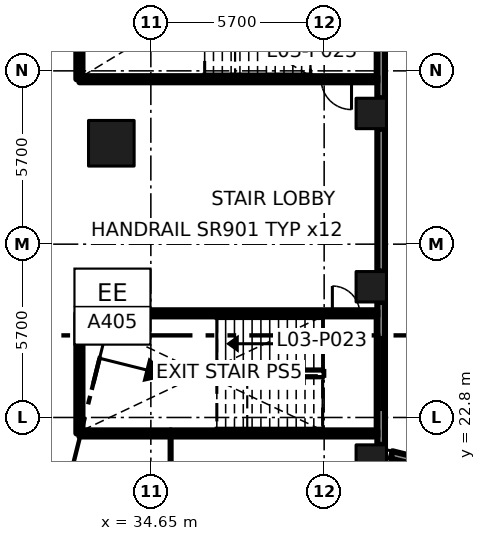
"""IFC4 building model, lengths in metres.
Left out: names, types, materials, properties, quantities, classifications, styles, units other than length and angle.
Written with IfcOpenShell. Run it as: python <this file> out.ifc"""

import sys

from ifc_helpers import new_model, si_unit, direction, frame, frame_2d, origin, origin_2d, place, context, subcontext, project, spatial, rectangle, extrude, element, fill, save


model = new_model("IFC4")
c1 = context("Model", 3, precision=1e-05, world=origin(), true_north=direction((0.0, 1.0)))
c2 = subcontext(c1, "Body", "Model", "MODEL_VIEW")
j1 = project(units=[si_unit("LENGTHUNIT", "METRE"), si_unit("PLANEANGLEUNIT", "RADIAN")], contexts=[c1])
p1 = place(None, origin())
s1 = spatial("IfcSite", under=j1, at=p1, CompositionType="ELEMENT")
p2 = place(p1, origin())
s2 = spatial("IfcBuilding", under=s1, at=p2, CompositionType="ELEMENT")
p3 = place(p2, frame((0.0, 0.0, 18.6)))
s3 = spatial("IfcBuildingStorey", under=s2, at=p3, CompositionType="ELEMENT", Elevation=18.6)
for number, where, z_axis, x_axis in (
    (1, (33.35, 26.119, 0.0), (0.0, 0.0, 1.0), (1.0, 0.0, 0.0)),
    (2, (33.35, 31.819, 0.0), (0.0, 0.0, 1.0), (1.0, 0.0, 0.0)),
):
    element("IfcColumn", number, at=place(p3, frame(where, z_axis=z_axis, x_axis=x_axis)), inside=s3, PredefinedType="COLUMN", context=c2, shape_type="SweptSolid", body=[
        extrude(rectangle(XDim=1.5, YDim=1.5, at=origin_2d()), origin(), (0.0, 0.0, 1.0), 4.8),
    ])
for number, where, z_axis, x_axis in (
    (3, (41.9, 21.399, 0.0), (0.0, 0.0, 1.0), (1.0, 0.0, 0.0)),
    (4, (41.9, 27.099, 0.0), (0.0, 0.0, 1.0), (1.0, 0.0, 0.0)),
    (5, (41.9, 32.799, 0.0), (0.0, 0.0, 1.0), (1.0, 0.0, 0.0)),
):
    element("IfcColumn", number, at=place(p3, frame(where, z_axis=z_axis, x_axis=x_axis)), inside=s3, PredefinedType="COLUMN", context=c2, shape_type="SweptSolid", body=[
        extrude(rectangle(XDim=1.0, YDim=1.0, at=origin_2d()), origin(), (0.0, 0.0, 1.0), 4.8),
    ])
p4 = place(p3, frame((32.3, 22.275, 0.0), z_axis=(0.0, 0.0, 1.0), x_axis=(0.0, 1.0, 0.0)))
e6 = element("IfcWall", 6, at=p4, inside=s3, PredefinedType="SOLIDWALL", context=c2, shape_type="SweptSolid", body=[
    extrude(rectangle(XDim=3.95, YDim=0.2, at=frame_2d((1.975, 0.0))), origin(), (0.0, 0.0, 1.0), 4.35),
])
p5 = place(p3, frame((32.3, 33.925, 0.0), z_axis=(0.0, 0.0, 1.0), x_axis=(0.0, 1.0, 0.0)))
e7 = element("IfcWall", 7, at=p5, inside=s3, PredefinedType="SOLIDWALL", context=c2, shape_type="SweptSolid", body=[
    extrude(rectangle(XDim=4.75, YDim=0.2, at=frame_2d((2.375, 0.0))), origin(), (0.0, 0.0, 1.0), 4.35),
])
p6 = place(p3, frame((34.12, 26.225, 0.0), z_axis=(0.0, 0.0, 1.0), x_axis=(1.0, 0.0, 0.0)))
e8 = element("IfcWall", 8, at=p6, inside=s3, PredefinedType="SOLIDWALL", context=c2, shape_type="SweptSolid", body=[
    extrude(rectangle(XDim=7.98, YDim=0.2, at=frame_2d((3.99, 0.0))), origin(), (0.0, 0.0, 1.0), 4.35),
])
p7 = place(p6, frame((6.5, 0.0, 0.0)))
e9 = element("IfcOpeningElement", 9, at=p7, cuts=e8, PredefinedType="OPENING", context=c2, shape_type="SweptSolid", body=[
    extrude(rectangle(XDim=0.9, YDim=2.1, at=frame_2d((0.45, 1.05))), frame((0.0, 0.11, 0.0), z_axis=(0.0, -1.0, 0.0), x_axis=(1.0, 0.0, 0.0)), (0.0, 0.0, 1.0), 0.22),
])
p8 = place(p3, frame((35.3, 9.6, 0.0), z_axis=(0.0, 0.0, 1.0), x_axis=(0.0, 1.0, 0.0)))
e10 = element("IfcWall", 10, at=p8, inside=s3, PredefinedType="PARTITIONING", context=c2, shape_type="SweptSolid", body=[
    extrude(rectangle(XDim=12.675, YDim=0.1, at=frame_2d((6.337, 0.0))), origin(), (0.0, 0.0, 1.0), 4.35),
])
p9 = place(p8, frame((1.98, 0.0, 0.0)))
e11 = element("IfcOpeningElement", 11, at=p9, cuts=e10, PredefinedType="OPENING", context=c2, shape_type="SweptSolid", body=[
    extrude(rectangle(XDim=1.0, YDim=2.1, at=frame_2d((0.5, 1.05))), frame((0.0, 0.06, 0.0), z_axis=(0.0, -1.0, 0.0), x_axis=(1.0, 0.0, 0.0)), (0.0, 0.0, 1.0), 0.12),
])
p10 = place(p8, frame((8.38, 0.0, 0.0)))
e12 = element("IfcOpeningElement", 12, at=p10, cuts=e10, PredefinedType="OPENING", context=c2, shape_type="SweptSolid", body=[
    extrude(rectangle(XDim=1.0, YDim=2.1, at=frame_2d((0.5, 1.05))), frame((0.0, 0.06, 0.0), z_axis=(0.0, -1.0, 0.0), x_axis=(1.0, 0.0, 0.0)), (0.0, 0.0, 1.0), 0.12),
])
p11 = place(p3, frame((35.3, 22.275, 0.0), z_axis=(0.0, 0.0, 1.0), x_axis=(-1.0, 0.0, 0.0)))
e13 = element("IfcWall", 13, at=p11, inside=s3, PredefinedType="SOLIDWALL", context=c2, shape_type="SweptSolid", body=[
    extrude(rectangle(XDim=3.0, YDim=0.2, at=frame_2d((1.5, 0.0))), origin(), (0.0, 0.0, 1.0), 4.35),
])
p12 = place(p3, frame((42.1, 33.925, 0.0), z_axis=(0.0, 0.0, 1.0), x_axis=(-1.0, 0.0, 0.0)))
e14 = element("IfcWall", 14, at=p12, inside=s3, PredefinedType="SOLIDWALL", context=c2, shape_type="SweptSolid", body=[
    extrude(rectangle(XDim=9.8, YDim=0.2, at=frame_2d((4.9, 0.0))), origin(), (0.0, 0.0, 1.0), 4.35),
])
p13 = place(p12, frame((0.85, 0.0, 0.0)))
e15 = element("IfcOpeningElement", 15, at=p13, cuts=e14, PredefinedType="OPENING", context=c2, shape_type="SweptSolid", body=[
    extrude(rectangle(XDim=1.0, YDim=2.1, at=frame_2d((0.5, 1.05))), frame((0.0, 0.11, 0.0), z_axis=(0.0, -1.0, 0.0), x_axis=(1.0, 0.0, 0.0)), (0.0, 0.0, 1.0), 0.22),
])
p14 = place(p3, frame((35.3, 22.275, 0.0), z_axis=(0.0, 0.0, 1.0), x_axis=(1.0, 0.0, 0.0)))
e16 = element("IfcWall", 16, at=p14, inside=s3, PredefinedType="SOLIDWALL", context=c2, shape_type="SweptSolid", body=[
    extrude(rectangle(XDim=6.8, YDim=0.2, at=frame_2d((3.4, 0.0))), origin(), (0.0, 0.0, 1.0), 4.35),
])
p15 = place(p3, frame((46.922, 20.482, 0.0), z_axis=(0.0, 0.0, 1.0), x_axis=(-0.970279921141, 0.241985277715, 0.0)))
e17 = element("IfcWall", 17, at=p15, inside=s3, PredefinedType="SOLIDWALL", context=c2, shape_type="SweptSolid", body=[
    extrude(rectangle(XDim=4.489, YDim=0.25, at=frame_2d((2.244, 0.0))), origin(), (0.0, 0.0, 1.0), 3.45),
])
p16 = place(p15, frame((1.397, 0.0, 0.9)))
e18 = element("IfcOpeningElement", 18, at=p16, cuts=e17, PredefinedType="OPENING", context=c2, shape_type="SweptSolid", body=[
    extrude(rectangle(XDim=2.4, YDim=2.1, at=frame_2d((1.2, 1.05))), frame((0.0, 0.135, 0.0), z_axis=(0.0, -1.0, 0.0), x_axis=(1.0, 0.0, 0.0)), (0.0, 0.0, 1.0), 0.27),
])
p17 = place(p3, frame((42.225, 21.899, 0.0), z_axis=(0.0, 0.0, 1.0), x_axis=(0.0, 1.0, 0.0)))
e19 = element("IfcWall", 19, at=p17, inside=s3, PredefinedType="SOLIDWALL", context=c2, shape_type="SweptSolid", body=[
    extrude(rectangle(XDim=4.7, YDim=0.25, at=frame_2d((2.35, 0.0))), origin(), (0.0, 0.0, 1.0), 3.45),
])
p18 = place(p17, frame((1.15, 0.0, 0.9)))
e20 = element("IfcOpeningElement", 20, at=p18, cuts=e19, PredefinedType="OPENING", context=c2, shape_type="SweptSolid", body=[
    extrude(rectangle(XDim=2.4, YDim=2.1, at=frame_2d((1.2, 1.05))), frame((0.0, 0.135, 0.0), z_axis=(0.0, -1.0, 0.0), x_axis=(1.0, 0.0, 0.0)), (0.0, 0.0, 1.0), 0.27),
])
p19 = place(p3, frame((42.225, 27.599, 0.0), z_axis=(0.0, 0.0, 1.0), x_axis=(0.0, 1.0, 0.0)))
e21 = element("IfcWall", 21, at=p19, inside=s3, PredefinedType="SOLIDWALL", context=c2, shape_type="SweptSolid", body=[
    extrude(rectangle(XDim=4.7, YDim=0.25, at=frame_2d((2.35, 0.0))), origin(), (0.0, 0.0, 1.0), 3.45),
])
p20 = place(p3, frame((42.225, 33.299, 0.0), z_axis=(0.0, 0.0, 1.0), x_axis=(0.0, 1.0, 0.0)))
e22 = element("IfcWall", 22, at=p20, inside=s3, PredefinedType="SOLIDWALL", context=c2, shape_type="SweptSolid", body=[
    extrude(rectangle(XDim=6.037, YDim=0.25, at=frame_2d((3.019, 0.0))), origin(), (0.0, 0.0, 1.0), 3.45),
])
p21 = place(p20, frame((1.819, 0.0, 0.9)))
e23 = element("IfcOpeningElement", 23, at=p21, cuts=e22, PredefinedType="OPENING", context=c2, shape_type="SweptSolid", body=[
    extrude(rectangle(XDim=2.4, YDim=2.1, at=frame_2d((1.2, 1.05))), frame((0.0, 0.135, 0.0), z_axis=(0.0, -1.0, 0.0), x_axis=(1.0, 0.0, 0.0)), (0.0, 0.0, 1.0), 0.27),
])
p22 = place(p7, origin())
e24 = element("IfcDoor", 24, at=p22, inside=s3, OperationType="SINGLE_SWING_LEFT", PredefinedType="DOOR", context=c2, shape_type="SweptSolid", body=[
    extrude(rectangle(XDim=0.9, YDim=2.1, at=frame_2d((0.45, 1.05))), frame((0.0, 0.025, 0.0), z_axis=(0.0, -1.0, 0.0), x_axis=(1.0, 0.0, 0.0)), (0.0, 0.0, 1.0), 0.05),
])
fill(e9, e24)
p23 = place(p13, origin())
e25 = element("IfcDoor", 25, at=p23, inside=s3, OperationType="SINGLE_SWING_LEFT", PredefinedType="DOOR", context=c2, shape_type="SweptSolid", body=[
    extrude(rectangle(XDim=1.0, YDim=2.1, at=frame_2d((0.5, 1.05))), frame((0.0, 0.025, 0.0), z_axis=(0.0, -1.0, 0.0), x_axis=(1.0, 0.0, 0.0)), (0.0, 0.0, 1.0), 0.05),
])
fill(e15, e25)
p24 = place(p18, origin())
e26 = element("IfcWindow", 26, at=p24, inside=s3, PartitioningType="DOUBLE_PANEL_VERTICAL", PredefinedType="WINDOW", context=c2, shape_type="SweptSolid", body=[
    extrude(rectangle(XDim=2.4, YDim=2.1, at=frame_2d((1.2, 1.05))), frame((0.0, 0.03, 0.0), z_axis=(0.0, -1.0, 0.0), x_axis=(1.0, 0.0, 0.0)), (0.0, 0.0, 1.0), 0.06),
])
fill(e20, e26)
save(model, sys.argv[1])
